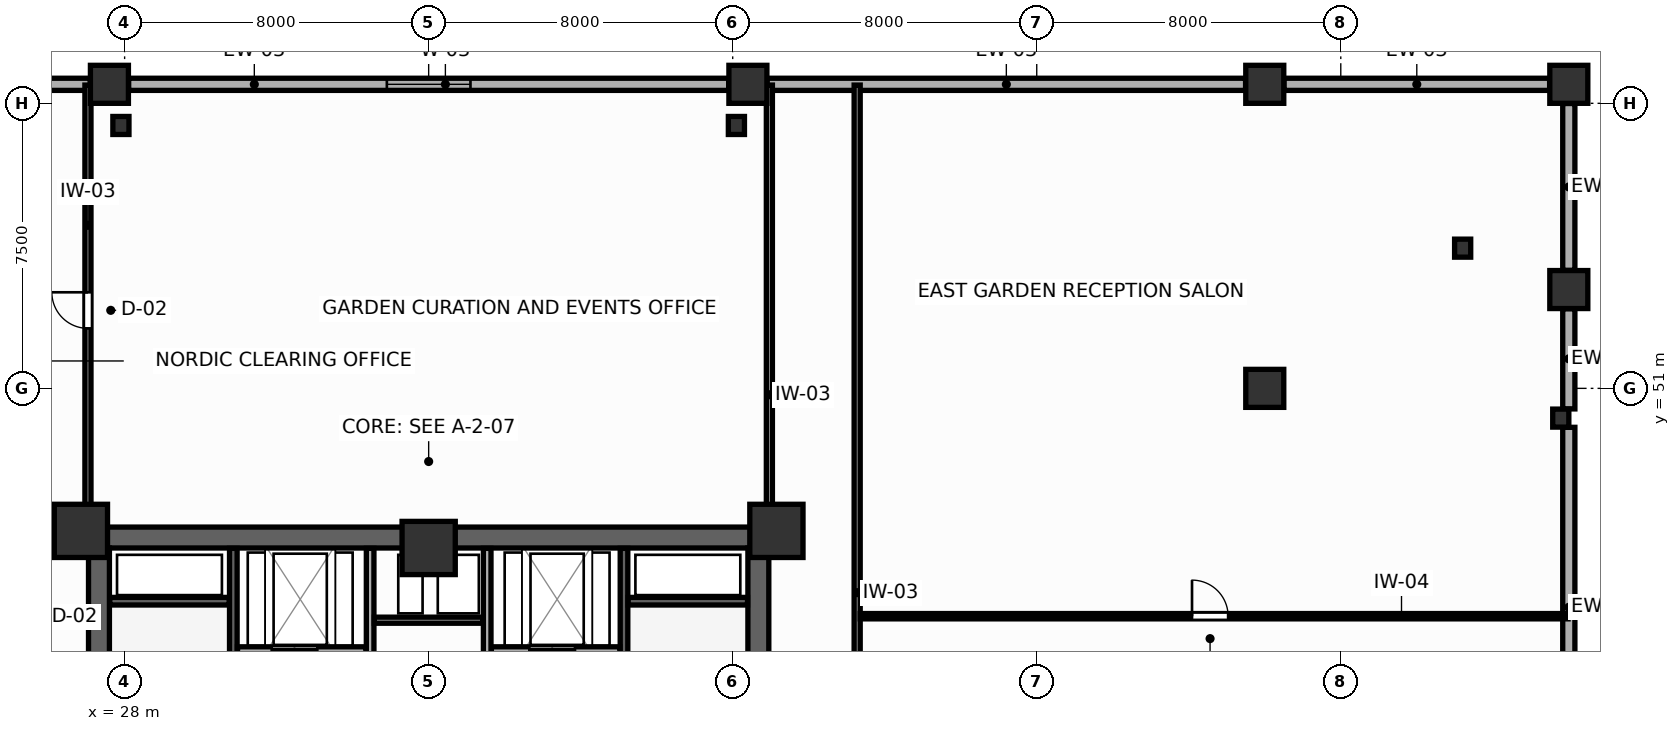
"""IFC4 building model, lengths in metres.
Left out: names, types, materials, properties, quantities, classifications, styles, units other than length and angle.
Written with IfcOpenShell. Run it as: python <this file> out.ifc"""

import sys

from ifc_helpers import new_model, si_unit, direction, frame, frame_2d, origin, origin_2d, place, context, subcontext, project, spatial, rectangle, i_section, extrude, source, transform, mapped, element, fill, save


model = new_model("IFC4")
c1 = context("Model", 3, precision=1e-05, world=origin(), true_north=direction((0.0, 1.0)))
c2 = subcontext(c1, "Body", "Model", "MODEL_VIEW")
j1 = project(units=[si_unit("LENGTHUNIT", "METRE"), si_unit("PLANEANGLEUNIT", "RADIAN")], contexts=[c1])
p1 = place(None, origin())
s1 = spatial("IfcSite", under=j1, at=p1, CompositionType="ELEMENT")
p2 = place(p1, origin())
s2 = spatial("IfcBuilding", under=s1, at=p2, CompositionType="ELEMENT")
p3 = place(p2, frame((0.0, 0.0, 19.2)))
s3 = spatial("IfcBuildingStorey", under=s2, at=p3, CompositionType="ELEMENT", Elevation=19.2)
p4 = place(p3, frame((27.05, 47.075, 0.0), z_axis=(0.0, 0.0, 1.0), x_axis=(1.0, 0.0, 0.0)))
e1 = element("IfcWall", 1, at=p4, inside=s3, PredefinedType="SHEAR", context=c2, shape_type="SweptSolid", body=[
    extrude(rectangle(XDim=17.9, YDim=0.55, at=frame_2d((8.95, 0.0))), origin(), (0.0, 0.0, 1.0), 4.8),
])
for number, where, z_axis, x_axis in (
    (2, (27.325, 37.8, 0.0), (0.0, 0.0, 1.0), (0.0, 1.0, 0.0)),
    (3, (44.675, 37.8, 0.0), (0.0, 0.0, 1.0), (0.0, 1.0, 0.0)),
):
    element("IfcWall", number, at=place(p3, frame(where, z_axis=z_axis, x_axis=x_axis)), inside=s3, PredefinedType="SHEAR", context=c2, shape_type="SweptSolid", body=[
        extrude(rectangle(XDim=9.0, YDim=0.55, at=frame_2d((4.5, 0.0))), origin(), (0.0, 0.0, 1.0), 4.8),
    ])
m1 = source(origin(), c2, "Body", "SweptSolid", [
    extrude(rectangle(XDim=1.4, YDim=1.4, at=origin_2d()), origin(), (0.0, 0.0, 1.0), 4.8),
])
for number, where, z_axis, x_axis in (
    (4, (26.85, 47.25, 0.0), (0.0, 0.0, 1.0), (1.0, 0.0, 0.0)),
    (5, (45.15, 47.25, 0.0), (0.0, 0.0, 1.0), (1.0, 0.0, 0.0)),
    (6, (36.0, 46.8, 0.0), (0.0, 0.0, 1.0), (1.0, 0.0, 0.0)),
):
    element("IfcColumn", number, at=place(p3, frame(where, z_axis=z_axis, x_axis=x_axis)), inside=s3, PredefinedType="COLUMN", context=c2, shape_type="MappedRepresentation", body=[
        mapped(m1, transform((0.0, 0.0, 0.0), scale=1.0)),
    ])
m2 = source(origin(), c2, "Body", "SweptSolid", [
    extrude(rectangle(XDim=1.0, YDim=1.0, at=origin_2d()), origin(), (0.0, 0.0, 1.0), 4.8),
])
for number, where, z_axis, x_axis in (
    (7, (66.0, 53.6, 0.0), (0.0, 0.0, 1.0), (1.0, 0.0, 0.0)),
    (8, (66.0, 59.0, 0.0), (0.0, 0.0, 1.0), (1.0, 0.0, 0.0)),
    (9, (27.6, 59.0, 0.0), (0.0, 0.0, 1.0), (1.0, 0.0, 0.0)),
    (10, (44.4, 59.0, 0.0), (0.0, 0.0, 1.0), (1.0, 0.0, 0.0)),
    (11, (58.0, 59.0, 0.0), (0.0, 0.0, 1.0), (1.0, 0.0, 0.0)),
    (12, (58.0, 51.0, 0.0), (0.0, 0.0, 1.0), (1.0, 0.0, 0.0)),
):
    element("IfcColumn", number, at=place(p3, frame(where, z_axis=z_axis, x_axis=x_axis)), inside=s3, PredefinedType="COLUMN", context=c2, shape_type="MappedRepresentation", body=[
        mapped(m2, transform((0.0, 0.0, 0.0), scale=1.0)),
    ])
m3 = source(origin(), c2, "Body", "SweptSolid", [
    extrude(i_section(OverallWidth=0.424, OverallDepth=0.474, WebThickness=0.045, FlangeThickness=0.072, FilletRadius=0.015, at=origin_2d()), origin(), (0.0, 0.0, 1.0), 4.8),
])
for number, where, z_axis, x_axis in (
    (13, (65.789, 50.217, 0.0), (0.0, 0.0, 1.0), (1.0, 0.0, 0.0)),
    (14, (63.207, 54.689, 0.0), (0.0, 0.0, 1.0), (1.0, 0.0, 0.0)),
    (15, (44.097, 57.917, 0.0), (0.0, 0.0, 1.0), (1.0, 0.0, 0.0)),
    (16, (27.903, 57.917, 0.0), (0.0, 0.0, 1.0), (1.0, 0.0, 0.0)),
):
    element("IfcColumn", number, at=place(p3, frame(where, z_axis=z_axis, x_axis=x_axis)), inside=s3, PredefinedType="COLUMN", context=c2, shape_type="MappedRepresentation", body=[
        mapped(m3, transform((0.0, 0.0, 0.0), scale=1.0)),
    ])
p5 = place(p3, frame((66.0, 40.505, 0.0), z_axis=(0.0, 0.0, 1.0), x_axis=(0.0, 1.0, 0.0)))
e17 = element("IfcWall", 17, at=p5, inside=s3, PredefinedType="SOLIDWALL", context=c2, shape_type="SweptSolid", body=[
    extrude(rectangle(XDim=9.47, YDim=0.32, at=frame_2d((4.735, 0.0))), origin(), (0.0, 0.0, 1.0), 3.88),
])
p6 = place(p3, frame((66.0, 50.459, 0.0), z_axis=(0.0, 0.0, 1.0), x_axis=(0.0, 1.0, 0.0)))
e18 = element("IfcWall", 18, at=p6, inside=s3, PredefinedType="SOLIDWALL", context=c2, shape_type="SweptSolid", body=[
    extrude(rectangle(XDim=2.636, YDim=0.32, at=frame_2d((1.318, 0.0))), origin(), (0.0, 0.0, 1.0), 3.88),
])
p7 = place(p3, frame((66.0, 54.105, 0.0), z_axis=(0.0, 0.0, 1.0), x_axis=(0.0, 1.0, 0.0)))
e19 = element("IfcWall", 19, at=p7, inside=s3, PredefinedType="SOLIDWALL", context=c2, shape_type="SweptSolid", body=[
    extrude(rectangle(XDim=4.39, YDim=0.32, at=frame_2d((2.195, 0.0))), origin(), (0.0, 0.0, 1.0), 3.88),
])
p8 = place(p3, frame((65.495, 59.0, 0.0), z_axis=(0.0, 0.0, 1.0), x_axis=(-1.0, 0.0, 0.0)))
e20 = element("IfcWall", 20, at=p8, inside=s3, PredefinedType="SOLIDWALL", context=c2, shape_type="SweptSolid", body=[
    extrude(rectangle(XDim=6.99, YDim=0.32, at=frame_2d((3.495, 0.0))), origin(), (0.0, 0.0, 1.0), 3.88),
])
p9 = place(p3, frame((57.495, 59.0, 0.0), z_axis=(0.0, 0.0, 1.0), x_axis=(-1.0, 0.0, 0.0)))
e21 = element("IfcWall", 21, at=p9, inside=s3, PredefinedType="SOLIDWALL", context=c2, shape_type="SweptSolid", body=[
    extrude(rectangle(XDim=12.59, YDim=0.32, at=frame_2d((6.295, 0.0))), origin(), (0.0, 0.0, 1.0), 3.88),
])
p10 = place(p3, frame((43.895, 59.0, 0.0), z_axis=(0.0, 0.0, 1.0), x_axis=(-1.0, 0.0, 0.0)))
e22 = element("IfcWall", 22, at=p10, inside=s3, PredefinedType="SOLIDWALL", context=c2, shape_type="SweptSolid", body=[
    extrude(rectangle(XDim=15.79, YDim=0.32, at=frame_2d((7.895, 0.0))), origin(), (0.0, 0.0, 1.0), 3.88),
])
p11 = place(p10, frame((6.795, 0.0, 0.75)))
e23 = element("IfcOpeningElement", 23, at=p11, cuts=e22, PredefinedType="OPENING", context=c2, shape_type="SweptSolid", body=[
    extrude(rectangle(XDim=2.2, YDim=2.0, at=frame_2d((1.1, 1.0))), frame((0.0, 0.17, 0.0), z_axis=(0.0, -1.0, 0.0), x_axis=(1.0, 0.0, 0.0)), (0.0, 0.0, 1.0), 0.34),
])
p12 = place(p3, frame((27.095, 59.0, 0.0), z_axis=(0.0, 0.0, 1.0), x_axis=(-1.0, 0.0, 0.0)))
e24 = element("IfcWall", 24, at=p12, inside=s3, PredefinedType="SOLIDWALL", context=c2, shape_type="SweptSolid", body=[
    extrude(rectangle(XDim=12.59, YDim=0.32, at=frame_2d((6.295, 0.0))), origin(), (0.0, 0.0, 1.0), 3.88),
])
p13 = place(p3, frame((30.86, 37.81, 0.0), z_axis=(0.0, 0.0, 1.0), x_axis=(0.0, 1.0, 0.0)))
e25 = element("IfcWall", 25, at=p13, inside=s3, PredefinedType="SHEAR", context=c2, shape_type="SweptSolid", body=[
    extrude(rectangle(XDim=8.98, YDim=0.2, at=frame_2d((4.49, 0.0))), origin(), (0.0, 0.0, 1.0), 4.8),
])
p14 = place(p13, frame((0.82, 0.0, 0.0)))
e26 = element("IfcOpeningElement", 26, at=p14, cuts=e25, PredefinedType="OPENING", context=c2, shape_type="SweptSolid", body=[
    extrude(rectangle(XDim=1.05, YDim=2.1, at=frame_2d((0.525, 1.05))), frame((0.0, 0.11, 0.0), z_axis=(0.0, -1.0, 0.0), x_axis=(1.0, 0.0, 0.0)), (0.0, 0.0, 1.0), 0.22),
])
p15 = place(p3, frame((27.61, 45.4, 0.0), z_axis=(0.0, 0.0, 1.0), x_axis=(1.0, 0.0, 0.0)))
e27 = element("IfcWall", 27, at=p15, inside=s3, PredefinedType="SHEAR", context=c2, shape_type="SweptSolid", body=[
    extrude(rectangle(XDim=3.14, YDim=0.2, at=frame_2d((1.57, 0.0))), origin(), (0.0, 0.0, 1.0), 4.8),
])
p16 = place(p3, frame((41.14, 37.81, 0.0), z_axis=(0.0, 0.0, 1.0), x_axis=(0.0, 1.0, 0.0)))
e28 = element("IfcWall", 28, at=p16, inside=s3, PredefinedType="SHEAR", context=c2, shape_type="SweptSolid", body=[
    extrude(rectangle(XDim=8.98, YDim=0.2, at=frame_2d((4.49, 0.0))), origin(), (0.0, 0.0, 1.0), 4.8),
])
p17 = place(p16, frame((0.82, 0.0, 0.0)))
e29 = element("IfcOpeningElement", 29, at=p17, cuts=e28, PredefinedType="OPENING", context=c2, shape_type="SweptSolid", body=[
    extrude(rectangle(XDim=1.05, YDim=2.1, at=frame_2d((0.525, 1.05))), frame((0.0, 0.11, 0.0), z_axis=(0.0, -1.0, 0.0), x_axis=(1.0, 0.0, 0.0)), (0.0, 0.0, 1.0), 0.22),
])
p18 = place(p3, frame((41.25, 45.4, 0.0), z_axis=(0.0, 0.0, 1.0), x_axis=(1.0, 0.0, 0.0)))
e30 = element("IfcWall", 30, at=p18, inside=s3, PredefinedType="SHEAR", context=c2, shape_type="SweptSolid", body=[
    extrude(rectangle(XDim=3.14, YDim=0.2, at=frame_2d((1.57, 0.0))), origin(), (0.0, 0.0, 1.0), 4.8),
])
p19 = place(p3, frame((30.97, 44.1, 0.0), z_axis=(0.0, 0.0, 1.0), x_axis=(1.0, 0.0, 0.0)))
e31 = element("IfcWall", 31, at=p19, inside=s3, PredefinedType="PARTITIONING", context=c2, shape_type="SweptSolid", body=[
    extrude(rectangle(XDim=3.38, YDim=0.2, at=frame_2d((1.69, 0.0))), origin(), (0.0, 0.0, 1.0), 4.58),
])
p20 = place(p19, frame((0.9, 0.0, 0.0)))
e32 = element("IfcOpeningElement", 32, at=p20, cuts=e31, PredefinedType="OPENING", context=c2, shape_type="SweptSolid", body=[
    extrude(rectangle(XDim=1.2, YDim=2.1, at=frame_2d((0.6, 1.05))), frame((0.0, 0.11, 0.0), z_axis=(0.0, -1.0, 0.0), x_axis=(1.0, 0.0, 0.0)), (0.0, 0.0, 1.0), 0.22),
])
p21 = place(p3, frame((37.65, 44.1, 0.0), z_axis=(0.0, 0.0, 1.0), x_axis=(1.0, 0.0, 0.0)))
e33 = element("IfcWall", 33, at=p21, inside=s3, PredefinedType="PARTITIONING", context=c2, shape_type="SweptSolid", body=[
    extrude(rectangle(XDim=3.38, YDim=0.2, at=frame_2d((1.69, 0.0))), origin(), (0.0, 0.0, 1.0), 4.58),
])
p22 = place(p21, frame((1.0, 0.0, 0.0)))
e34 = element("IfcOpeningElement", 34, at=p22, cuts=e33, PredefinedType="OPENING", context=c2, shape_type="SweptSolid", body=[
    extrude(rectangle(XDim=1.2, YDim=2.1, at=frame_2d((0.6, 1.05))), frame((0.0, 0.11, 0.0), z_axis=(0.0, -1.0, 0.0), x_axis=(1.0, 0.0, 0.0)), (0.0, 0.0, 1.0), 0.22),
])
p23 = place(p3, frame((34.46, 37.81, 0.0), z_axis=(0.0, 0.0, 1.0), x_axis=(0.0, 1.0, 0.0)))
e35 = element("IfcWall", 35, at=p23, inside=s3, PredefinedType="PARTITIONING", context=c2, shape_type="SweptSolid", body=[
    extrude(rectangle(XDim=8.98, YDim=0.2, at=frame_2d((4.49, 0.0))), origin(), (0.0, 0.0, 1.0), 4.58),
])
p24 = place(p23, frame((0.65, 0.0, 0.0)))
e36 = element("IfcOpeningElement", 36, at=p24, cuts=e35, PredefinedType="OPENING", context=c2, shape_type="SweptSolid", body=[
    extrude(rectangle(XDim=0.85, YDim=2.05, at=frame_2d((0.425, 1.025))), frame((0.0, 0.11, 0.0), z_axis=(0.0, -1.0, 0.0), x_axis=(1.0, 0.0, 0.0)), (0.0, 0.0, 1.0), 0.22),
])
p25 = place(p3, frame((37.54, 37.81, 0.0), z_axis=(0.0, 0.0, 1.0), x_axis=(0.0, 1.0, 0.0)))
e37 = element("IfcWall", 37, at=p25, inside=s3, PredefinedType="PARTITIONING", context=c2, shape_type="SweptSolid", body=[
    extrude(rectangle(XDim=8.98, YDim=0.2, at=frame_2d((4.49, 0.0))), origin(), (0.0, 0.0, 1.0), 4.58),
])
p26 = place(p25, frame((0.65, 0.0, 0.0)))
e38 = element("IfcOpeningElement", 38, at=p26, cuts=e37, PredefinedType="OPENING", context=c2, shape_type="SweptSolid", body=[
    extrude(rectangle(XDim=0.85, YDim=2.05, at=frame_2d((0.425, 1.025))), frame((0.0, 0.11, 0.0), z_axis=(0.0, -1.0, 0.0), x_axis=(1.0, 0.0, 0.0)), (0.0, 0.0, 1.0), 0.22),
])
p27 = place(p3, frame((34.57, 44.9, 0.0), z_axis=(0.0, 0.0, 1.0), x_axis=(1.0, 0.0, 0.0)))
e39 = element("IfcWall", 39, at=p27, inside=s3, PredefinedType="PARTITIONING", context=c2, shape_type="SweptSolid", body=[
    extrude(rectangle(XDim=2.86, YDim=0.16, at=frame_2d((1.43, 0.0))), origin(), (0.0, 0.0, 1.0), 4.58),
])
p28 = place(p3, frame((47.275, 32.27, 0.0), z_axis=(0.0, 0.0, 1.0), x_axis=(0.0, 1.0, 0.0)))
e40 = element("IfcWall", 40, at=p28, inside=s3, PredefinedType="PARTITIONING", context=c2, shape_type="SweptSolid", body=[
    extrude(rectangle(XDim=26.71, YDim=0.16, at=frame_2d((13.355, 0.0))), origin(), (0.0, 0.0, 1.0), 4.58),
])
p29 = place(p3, frame((27.035, 47.34, 0.0), z_axis=(0.0, 0.0, 1.0), x_axis=(0.0, 1.0, 0.0)))
e41 = element("IfcWall", 41, at=p29, inside=s3, PredefinedType="PARTITIONING", context=c2, shape_type="SweptSolid", body=[
    extrude(rectangle(XDim=11.64, YDim=0.16, at=frame_2d((5.82, 0.0))), origin(), (0.0, 0.0, 1.0), 4.58),
])
p30 = place(p29, frame((5.238, 0.0, 0.0)))
e42 = element("IfcOpeningElement", 42, at=p30, cuts=e41, PredefinedType="OPENING", context=c2, shape_type="SweptSolid", body=[
    extrude(rectangle(XDim=0.95, YDim=2.05, at=frame_2d((0.475, 1.025))), frame((0.0, 0.09, 0.0), z_axis=(0.0, -1.0, 0.0), x_axis=(1.0, 0.0, 0.0)), (0.0, 0.0, 1.0), 0.18),
])
p31 = place(p3, frame((44.965, 47.34, 0.0), z_axis=(0.0, 0.0, 1.0), x_axis=(0.0, 1.0, 0.0)))
e43 = element("IfcWall", 43, at=p31, inside=s3, PredefinedType="PARTITIONING", context=c2, shape_type="SweptSolid", body=[
    extrude(rectangle(XDim=11.64, YDim=0.16, at=frame_2d((5.82, 0.0))), origin(), (0.0, 0.0, 1.0), 4.58),
])
p32 = place(p3, frame((47.357, 45.005, 0.0), z_axis=(0.0, 0.0, 1.0), x_axis=(1.0, 0.0, 0.0)))
e44 = element("IfcWall", 44, at=p32, inside=s3, PredefinedType="PARTITIONING", context=c2, shape_type="SweptSolid", body=[
    extrude(rectangle(XDim=18.623, YDim=0.14, at=frame_2d((9.312, 0.0))), origin(), (0.0, 0.0, 1.0), 4.58),
])
p33 = place(p32, frame((8.729, 0.0, 0.0)))
e45 = element("IfcOpeningElement", 45, at=p33, cuts=e44, PredefinedType="OPENING", context=c2, shape_type="SweptSolid", body=[
    extrude(rectangle(XDim=0.95, YDim=2.05, at=frame_2d((0.475, 1.025))), frame((0.0, 0.08, 0.0), z_axis=(0.0, -1.0, 0.0), x_axis=(1.0, 0.0, 0.0)), (0.0, 0.0, 1.0), 0.16),
])
p34 = place(p11, origin())
e46 = element("IfcWindow", 46, at=p34, inside=s3, PartitioningType="SINGLE_PANEL", PredefinedType="WINDOW", context=c2, shape_type="SweptSolid", body=[
    extrude(rectangle(XDim=2.2, YDim=2.0, at=frame_2d((1.1, 1.0))), frame((0.0, 0.03, 0.0), z_axis=(0.0, -1.0, 0.0), x_axis=(1.0, 0.0, 0.0)), (0.0, 0.0, 1.0), 0.06),
])
fill(e23, e46)
p35 = place(p20, origin())
e47 = element("IfcDoor", 47, at=p35, inside=s3, OperationType="DOUBLE_DOOR_SLIDING", PredefinedType="DOOR", context=c2, shape_type="SweptSolid", body=[
    extrude(rectangle(XDim=1.2, YDim=2.1, at=frame_2d((0.6, 1.05))), frame((0.0, 0.025, 0.0), z_axis=(0.0, -1.0, 0.0), x_axis=(1.0, 0.0, 0.0)), (0.0, 0.0, 1.0), 0.05),
])
fill(e32, e47)
p36 = place(p22, origin())
e48 = element("IfcDoor", 48, at=p36, inside=s3, OperationType="DOUBLE_DOOR_SLIDING", PredefinedType="DOOR", context=c2, shape_type="SweptSolid", body=[
    extrude(rectangle(XDim=1.2, YDim=2.1, at=frame_2d((0.6, 1.05))), frame((0.0, 0.025, 0.0), z_axis=(0.0, -1.0, 0.0), x_axis=(1.0, 0.0, 0.0)), (0.0, 0.0, 1.0), 0.05),
])
fill(e34, e48)
p37 = place(p30, origin())
e49 = element("IfcDoor", 49, at=p37, inside=s3, OperationType="SINGLE_SWING_RIGHT", PredefinedType="DOOR", context=c2, shape_type="SweptSolid", body=[
    extrude(rectangle(XDim=0.95, YDim=2.05, at=frame_2d((0.475, 1.025))), frame((0.0, 0.025, 0.0), z_axis=(0.0, -1.0, 0.0), x_axis=(1.0, 0.0, 0.0)), (0.0, 0.0, 1.0), 0.05),
])
fill(e42, e49)
p38 = place(p33, origin())
e50 = element("IfcDoor", 50, at=p38, inside=s3, OperationType="SINGLE_SWING_LEFT", PredefinedType="DOOR", context=c2, shape_type="SweptSolid", body=[
    extrude(rectangle(XDim=0.95, YDim=2.05, at=frame_2d((0.475, 1.025))), frame((0.0, 0.025, 0.0), z_axis=(0.0, -1.0, 0.0), x_axis=(1.0, 0.0, 0.0)), (0.0, 0.0, 1.0), 0.05),
])
fill(e45, e50)
save(model, sys.argv[1])
